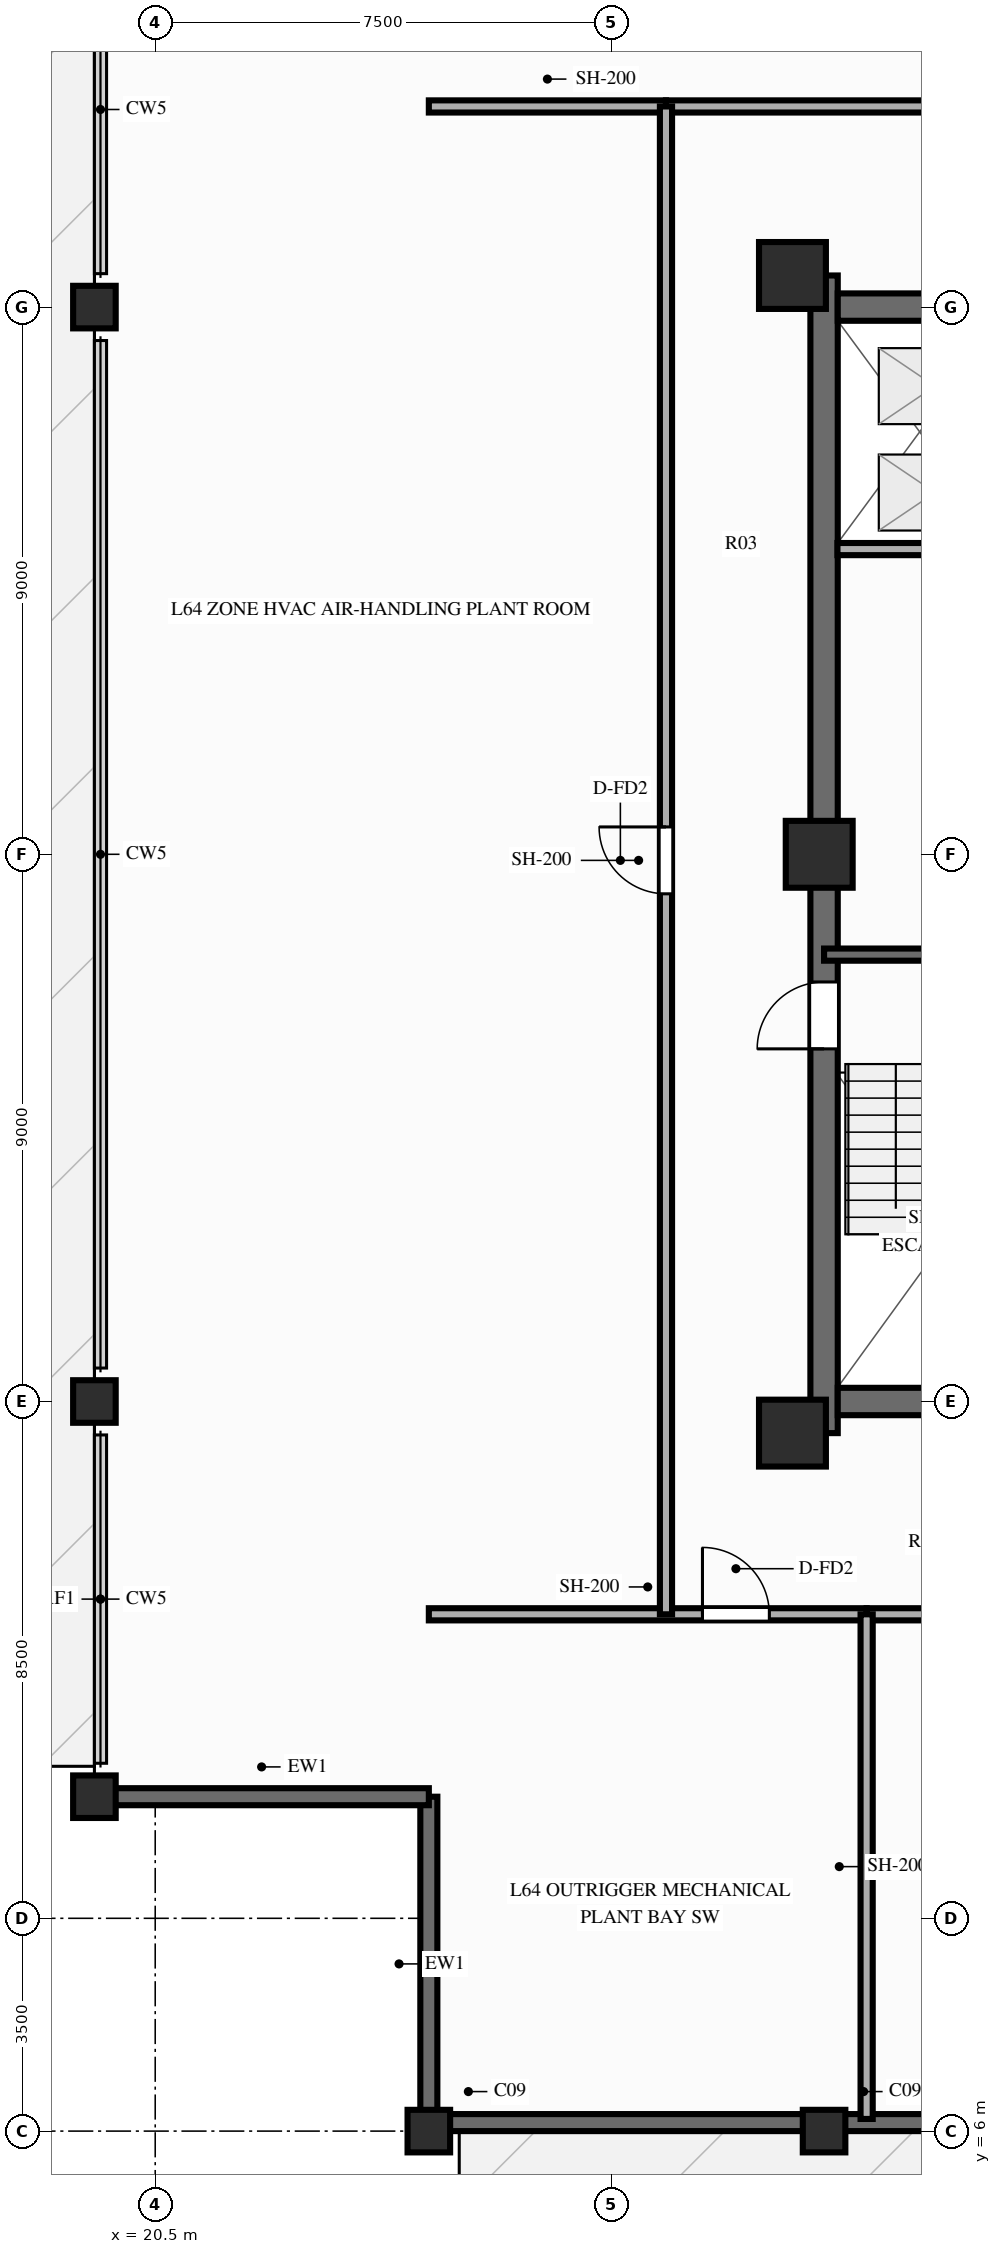
"""IFC4 building model, lengths in metres.
Left out: names, types, materials, properties, quantities, classifications, styles, units other than length and angle.
Written with IfcOpenShell. Run it as: python <this file> out.ifc"""

import sys

from ifc_helpers import new_model, si_unit, direction, frame, frame_2d, origin, origin_2d, place, context, subcontext, project, spatial, rectangle, extrude, source, transform, mapped, element, fill, save


model = new_model("IFC4")
c1 = context("Model", 3, precision=1e-05, world=origin(), true_north=direction((0.0, 1.0)))
c2 = subcontext(c1, "Body", "Model", "MODEL_VIEW")
j1 = project(units=[si_unit("LENGTHUNIT", "METRE"), si_unit("PLANEANGLEUNIT", "RADIAN")], contexts=[c1])
p1 = place(None, origin())
s1 = spatial("IfcSite", under=j1, at=p1, CompositionType="ELEMENT")
p2 = place(p1, origin())
s2 = spatial("IfcBuilding", under=s1, at=p2, CompositionType="ELEMENT")
p3 = place(p2, frame((0.0, 0.0, 206.5)))
s3 = spatial("IfcBuildingStorey", under=s2, at=p3, CompositionType="ELEMENT", Elevation=206.5)
p4 = place(p3, frame((31.5, 17.48, 0.0), z_axis=(0.0, 0.0, 1.0), x_axis=(0.0, 1.0, 0.0)))
e1 = element("IfcWall", 1, at=p4, inside=s3, PredefinedType="SHEAR", context=c2, shape_type="SweptSolid", body=[
    extrude(rectangle(XDim=19.04, YDim=0.45, at=frame_2d((9.52, 0.0))), origin(), (0.0, 0.0, 1.0), 3.8),
])
p5 = place(p4, frame((6.32, 0.0, 0.0)))
e2 = element("IfcOpeningElement", 2, at=p5, cuts=e1, PredefinedType="OPENING", context=c2, shape_type="SweptSolid", body=[
    extrude(rectangle(XDim=1.1, YDim=2.15, at=frame_2d((0.55, 1.075))), frame((0.0, 0.237, 0.0), z_axis=(0.0, -1.0, 0.0), x_axis=(1.0, 0.0, 0.0)), (0.0, 0.0, 1.0), 0.474),
])
p6 = place(p3, frame((31.725, 18.0, 0.0), z_axis=(0.0, 0.0, 1.0), x_axis=(1.0, 0.0, 0.0)))
e3 = element("IfcWall", 3, at=p6, inside=s3, PredefinedType="SHEAR", context=c2, shape_type="SweptSolid", body=[
    extrude(rectangle(XDim=12.55, YDim=0.45, at=frame_2d((6.275, 0.0))), origin(), (0.0, 0.0, 1.0), 3.8),
])
p7 = place(p3, frame((31.725, 36.0, 0.0), z_axis=(0.0, 0.0, 1.0), x_axis=(1.0, 0.0, 0.0)))
e4 = element("IfcWall", 4, at=p7, inside=s3, PredefinedType="SHEAR", context=c2, shape_type="SweptSolid", body=[
    extrude(rectangle(XDim=12.55, YDim=0.45, at=frame_2d((6.275, 0.0))), origin(), (0.0, 0.0, 1.0), 3.8),
])
p8 = place(p7, frame((5.225, 0.0, 0.0), z_axis=(0.0, 0.0, 1.0), x_axis=(-1.0, 0.0, 0.0)))
e5 = element("IfcOpeningElement", 5, at=p8, cuts=e4, PredefinedType="OPENING", context=c2, shape_type="SweptSolid", body=[
    extrude(rectangle(XDim=1.4, YDim=2.15, at=frame_2d((0.7, 1.075))), frame((0.0, 0.237, 0.0), z_axis=(0.0, -1.0, 0.0), x_axis=(1.0, 0.0, 0.0)), (0.0, 0.0, 1.0), 0.474),
])
m1 = source(origin(), c2, "Body", "SweptSolid", [
    extrude(rectangle(XDim=1.1, YDim=1.1, at=origin_2d()), origin(), (0.0, 0.0, 1.0), 3.8),
])
for number, where, z_axis, x_axis in (
    (6, (30.98, 17.48, 0.0), (0.0, 0.0, 1.0), (1.0, 0.0, 0.0)),
    (7, (30.98, 36.52, 0.0), (0.0, 0.0, 1.0), (1.0, 0.0, 0.0)),
    (8, (31.42, 27.0, 0.0), (0.0, 0.0, 1.0), (1.0, 0.0, 0.0)),
):
    element("IfcColumn", number, at=place(p3, frame(where, z_axis=z_axis, x_axis=x_axis)), inside=s3, PredefinedType="COLUMN", context=c2, shape_type="MappedRepresentation", body=[
        mapped(m1, transform((0.0, 0.0, 0.0), scale=1.0)),
    ])
m2 = source(origin(), c2, "Body", "SweptSolid", [
    extrude(rectangle(XDim=0.7, YDim=0.7, at=origin_2d()), origin(), (0.0, 0.0, 1.0), 3.8),
])
for number, where, z_axis, x_axis in (
    (9, (25.0, 6.0, 0.0), (0.0, 0.0, 1.0), (1.0, 0.0, 0.0)),
    (10, (31.5, 6.0, 0.0), (0.0, 0.0, 1.0), (1.0, 0.0, 0.0)),
    (11, (19.5, 36.0, 0.0), (0.0, 0.0, 1.0), (1.0, 0.0, 0.0)),
    (12, (19.5, 18.0, 0.0), (0.0, 0.0, 1.0), (1.0, 0.0, 0.0)),
    (13, (19.5, 11.5, 0.0), (0.0, 0.0, 1.0), (1.0, 0.0, 0.0)),
):
    element("IfcColumn", number, at=place(p3, frame(where, z_axis=z_axis, x_axis=x_axis)), inside=s3, PredefinedType="COLUMN", context=c2, shape_type="MappedRepresentation", body=[
        mapped(m2, transform((0.0, 0.0, 0.0), scale=1.0)),
    ])
p9 = place(p3, frame((25.0, 6.14, 0.0), z_axis=(0.0, 0.0, 1.0), x_axis=(1.0, 0.0, 0.0)))
e14 = element("IfcWall", 14, at=p9, inside=s3, PredefinedType="SOLIDWALL", context=c2, shape_type="SweptSolid", body=[
    extrude(rectangle(XDim=26.0, YDim=0.28, at=frame_2d((13.0, 0.0))), origin(), (0.0, 0.0, 1.0), 2.34),
])
p10 = place(p9, frame((9.2, 0.0, 0.45)))
e15 = element("IfcOpeningElement", 15, at=p10, cuts=e14, PredefinedType="OPENING", context=c2, shape_type="SweptSolid", body=[
    extrude(rectangle(XDim=1.2, YDim=0.9, at=frame_2d((0.6, 0.45))), frame((0.0, 0.152, 0.0), z_axis=(0.0, -1.0, 0.0), x_axis=(1.0, 0.0, 0.0)), (0.0, 0.0, 1.0), 0.304),
])
p11 = place(p9, frame((16.2, 0.0, 0.45)))
e16 = element("IfcOpeningElement", 16, at=p11, cuts=e14, PredefinedType="OPENING", context=c2, shape_type="SweptSolid", body=[
    extrude(rectangle(XDim=1.2, YDim=0.9, at=frame_2d((0.6, 0.45))), frame((0.0, 0.152, 0.0), z_axis=(0.0, -1.0, 0.0), x_axis=(1.0, 0.0, 0.0)), (0.0, 0.0, 1.0), 0.304),
])
for number, where, z_axis, x_axis in (
    (17, (25.0, 6.0, 0.0), (0.0, 0.0, 1.0), (0.0, 1.0, 0.0)),
    (18, (19.5, 11.5, 0.0), (0.0, 0.0, 1.0), (1.0, 0.0, 0.0)),
):
    element("IfcWall", number, at=place(p3, frame(where, z_axis=z_axis, x_axis=x_axis)), inside=s3, PredefinedType="SOLIDWALL", context=c2, shape_type="SweptSolid", body=[
        extrude(rectangle(XDim=5.5, YDim=0.28, at=frame_2d((2.75, 0.0))), origin(), (0.0, 0.0, 1.0), 2.34),
    ])
p12 = place(p3, frame((31.5, 25.35, 0.0), z_axis=(0.0, 0.0, 1.0), x_axis=(1.0, 0.0, 0.0)))
e19 = element("IfcWall", 19, at=p12, inside=s3, PredefinedType="SOLIDWALL", context=c2, shape_type="SweptSolid", body=[
    extrude(rectangle(XDim=3.93, YDim=0.2, at=frame_2d((1.965, 0.0))), origin(), (0.0, 0.0, 1.0), 3.59),
])
p13 = place(p3, frame((31.72, 32.02, 0.0), z_axis=(0.0, 0.0, 1.0), x_axis=(1.0, 0.0, 0.0)))
e20 = element("IfcWall", 20, at=p13, inside=s3, PredefinedType="PARTITIONING", context=c2, shape_type="SweptSolid", body=[
    extrude(rectangle(XDim=2.8, YDim=0.2, at=frame_2d((1.4, 0.0))), origin(), (0.0, 0.0, 1.0), 3.59),
])
p14 = place(p3, frame((25.0, 14.5, 0.0), z_axis=(0.0, 0.0, 1.0), x_axis=(1.0, 0.0, 0.0)))
e21 = element("IfcWall", 21, at=p14, inside=s3, PredefinedType="PARTITIONING", context=c2, shape_type="SweptSolid", body=[
    extrude(rectangle(XDim=7.2, YDim=0.2, at=frame_2d((3.6, 0.0))), origin(), (0.0, 0.0, 1.0), 3.59),
])
p15 = place(p14, frame((4.5, 0.0, 0.0)))
e22 = element("IfcOpeningElement", 22, at=p15, cuts=e21, PredefinedType="OPENING", context=c2, shape_type="SweptSolid", body=[
    extrude(rectangle(XDim=1.1, YDim=2.15, at=frame_2d((0.55, 1.075))), frame((0.0, 0.112, 0.0), z_axis=(0.0, -1.0, 0.0), x_axis=(1.0, 0.0, 0.0)), (0.0, 0.0, 1.0), 0.224),
])
p16 = place(p3, frame((32.2, 14.5, 0.0), z_axis=(0.0, 0.0, 1.0), x_axis=(1.0, 0.0, 0.0)))
e23 = element("IfcWall", 23, at=p16, inside=s3, PredefinedType="PARTITIONING", context=c2, shape_type="SweptSolid", body=[
    extrude(rectangle(XDim=8.1, YDim=0.2, at=frame_2d((4.05, 0.0))), origin(), (0.0, 0.0, 1.0), 3.59),
])
p17 = place(p16, frame((3.5, 0.0, 0.0)))
e24 = element("IfcOpeningElement", 24, at=p17, cuts=e23, PredefinedType="OPENING", context=c2, shape_type="SweptSolid", body=[
    extrude(rectangle(XDim=1.1, YDim=2.15, at=frame_2d((0.55, 1.075))), frame((0.0, 0.112, 0.0), z_axis=(0.0, -1.0, 0.0), x_axis=(1.0, 0.0, 0.0)), (0.0, 0.0, 1.0), 0.224),
])
p18 = place(p3, frame((32.2, 6.2, 0.0), z_axis=(0.0, 0.0, 1.0), x_axis=(0.0, 1.0, 0.0)))
e25 = element("IfcWall", 25, at=p18, inside=s3, PredefinedType="PARTITIONING", context=c2, shape_type="SweptSolid", body=[
    extrude(rectangle(XDim=8.3, YDim=0.2, at=frame_2d((4.15, 0.0))), origin(), (0.0, 0.0, 1.0), 3.59),
])
p19 = place(p3, frame((25.0, 39.3, 0.0), z_axis=(0.0, 0.0, 1.0), x_axis=(1.0, 0.0, 0.0)))
e26 = element("IfcWall", 26, at=p19, inside=s3, PredefinedType="PARTITIONING", context=c2, shape_type="SweptSolid", body=[
    extrude(rectangle(XDim=3.9, YDim=0.2, at=frame_2d((1.95, 0.0))), origin(), (0.0, 0.0, 1.0), 3.59),
])
p20 = place(p3, frame((28.9, 39.3, 0.0), z_axis=(0.0, 0.0, 1.0), x_axis=(1.0, 0.0, 0.0)))
e27 = element("IfcWall", 27, at=p20, inside=s3, PredefinedType="PARTITIONING", context=c2, shape_type="SweptSolid", body=[
    extrude(rectangle(XDim=18.2, YDim=0.2, at=frame_2d((9.1, 0.0))), origin(), (0.0, 0.0, 1.0), 3.59),
])
p21 = place(p20, frame((8.55, 0.0, 0.0)))
e28 = element("IfcOpeningElement", 28, at=p21, cuts=e27, PredefinedType="OPENING", context=c2, shape_type="SweptSolid", body=[
    extrude(rectangle(XDim=1.1, YDim=2.15, at=frame_2d((0.55, 1.075))), frame((0.0, 0.112, 0.0), z_axis=(0.0, -1.0, 0.0), x_axis=(1.0, 0.0, 0.0)), (0.0, 0.0, 1.0), 0.224),
])
p22 = place(p3, frame((28.9, 14.5, 0.0), z_axis=(0.0, 0.0, 1.0), x_axis=(0.0, 1.0, 0.0)))
e29 = element("IfcWall", 29, at=p22, inside=s3, PredefinedType="PARTITIONING", context=c2, shape_type="SweptSolid", body=[
    extrude(rectangle(XDim=24.8, YDim=0.2, at=frame_2d((12.4, 0.0))), origin(), (0.0, 0.0, 1.0), 3.59),
])
p23 = place(p22, frame((11.85, 0.0, 0.0)))
e30 = element("IfcOpeningElement", 30, at=p23, cuts=e29, PredefinedType="OPENING", context=c2, shape_type="SweptSolid", body=[
    extrude(rectangle(XDim=1.1, YDim=2.15, at=frame_2d((0.55, 1.075))), frame((0.0, 0.112, 0.0), z_axis=(0.0, -1.0, 0.0), x_axis=(1.0, 0.0, 0.0)), (0.0, 0.0, 1.0), 0.224),
])
m3 = source(origin(), c2, "Body", "SweptSolid", [
    extrude(rectangle(XDim=1.1, YDim=2.15, at=frame_2d((0.55, 1.075))), frame((0.0, 0.025, 0.0), z_axis=(0.0, -1.0, 0.0), x_axis=(1.0, 0.0, 0.0)), (0.0, 0.0, 1.0), 0.05),
])
p24 = place(p5, origin())
e31 = element("IfcDoor", 31, at=p24, inside=s3, OperationType="SINGLE_SWING_LEFT", PredefinedType="DOOR", context=c2, shape_type="MappedRepresentation", body=[
    mapped(m3, transform((0.0, 0.0, 0.0), scale=1.0)),
])
fill(e2, e31)
p25 = place(p15, origin())
e32 = element("IfcDoor", 32, at=p25, inside=s3, OperationType="SINGLE_SWING_LEFT", PredefinedType="DOOR", context=c2, shape_type="MappedRepresentation", body=[
    mapped(m3, transform((0.0, 0.0, 0.0), scale=1.0)),
])
fill(e22, e32)
p26 = place(p23, origin())
e33 = element("IfcDoor", 33, at=p26, inside=s3, OperationType="SINGLE_SWING_RIGHT", PredefinedType="DOOR", context=c2, shape_type="MappedRepresentation", body=[
    mapped(m3, transform((0.0, 0.0, 0.0), scale=1.0)),
])
fill(e30, e33)
save(model, sys.argv[1])
